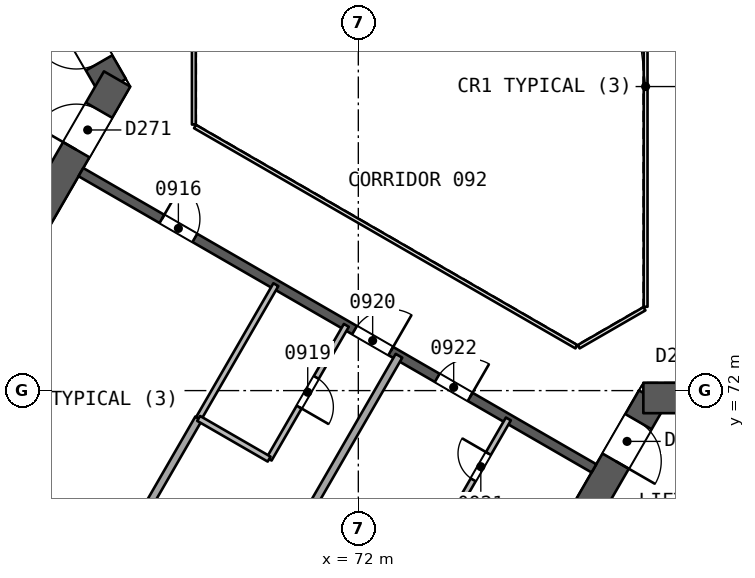
"""IFC4 building model, lengths in metres.
Left out: names, types, materials, properties, quantities, classifications, styles, units other than length and angle.
Written with IfcOpenShell. Run it as: python <this file> out.ifc"""

import sys

from ifc_helpers import new_model, si_unit, direction, frame, frame_2d, origin, place, context, subcontext, project, spatial, rectangle, extrude, element, fill, save


model = new_model("IFC4")
c1 = context("Model", 3, precision=1e-05, world=origin(), true_north=direction((0.0, 1.0)))
c2 = subcontext(c1, "Body", "Model", "MODEL_VIEW")
j1 = project(units=[si_unit("LENGTHUNIT", "METRE"), si_unit("PLANEANGLEUNIT", "RADIAN")], contexts=[c1])
p1 = place(None, origin())
s1 = spatial("IfcSite", under=j1, at=p1, CompositionType="ELEMENT")
p2 = place(p1, origin())
s2 = spatial("IfcBuilding", under=s1, at=p2, CompositionType="ELEMENT")
p3 = place(p2, frame((0.0, 0.0, 44.8)))
s3 = spatial("IfcBuildingStorey", under=s2, at=p3, CompositionType="ELEMENT", Elevation=44.8)
p4 = place(p3, frame((65.538, 80.0, 0.0), z_axis=(0.0, 0.0, 1.0), x_axis=(-0.49999662545, 0.866027352073, 0.0)))
e1 = element("IfcWall", 1, at=p4, inside=s3, PredefinedType="SHEAR", context=c2, shape_type="SweptSolid", body=[
    extrude(rectangle(XDim=10.149, YDim=0.8, at=frame_2d((5.074, 0.0))), origin(), (0.0, 0.0, 1.0), 3.7),
])
p5 = place(p4, frame((0.719, 0.0, 0.0)))
e2 = element("IfcOpeningElement", 2, at=p5, cuts=e1, PredefinedType="OPENING", context=c2, shape_type="SweptSolid", body=[
    extrude(rectangle(XDim=1.2, YDim=2.1, at=frame_2d((0.6, 1.05))), frame((0.0, 0.411, 0.0), z_axis=(0.0, -1.0, 0.0), x_axis=(1.0, 0.0, 0.0)), (0.0, 0.0, 1.0), 0.821),
])
p6 = place(p3, frame((60.664, 71.557, 0.0), z_axis=(0.0, 0.0, 1.0), x_axis=(0.50000409368, 0.866023040284, 0.0)))
e3 = element("IfcWall", 3, at=p6, inside=s3, PredefinedType="SHEAR", context=c2, shape_type="SweptSolid", body=[
    extrude(rectangle(XDim=9.98, YDim=0.8, at=frame_2d((4.99, 0.0))), origin(), (0.0, 0.0, 1.0), 3.7),
])
p7 = place(p6, frame((7.83, 0.0, 0.0)))
e4 = element("IfcOpeningElement", 4, at=p7, cuts=e3, PredefinedType="OPENING", context=c2, shape_type="SweptSolid", body=[
    extrude(rectangle(XDim=1.2, YDim=2.1, at=frame_2d((0.6, 1.05))), frame((0.0, 0.411, 0.0), z_axis=(0.0, -1.0, 0.0), x_axis=(1.0, 0.0, 0.0)), (0.0, 0.0, 1.0), 0.821),
])
p8 = place(p3, frame((79.731, 71.806, 0.0), z_axis=(0.0, 0.0, 1.0), x_axis=(-0.49999662545, -0.866027352073, 0.0)))
e5 = element("IfcWall", 5, at=p8, inside=s3, PredefinedType="SHEAR", context=c2, shape_type="SweptSolid", body=[
    extrude(rectangle(XDim=10.149, YDim=0.8, at=frame_2d((5.074, 0.0))), origin(), (0.0, 0.0, 1.0), 3.7),
])
p9 = place(p8, frame((0.719, 0.0, 0.0)))
e6 = element("IfcOpeningElement", 6, at=p9, cuts=e5, PredefinedType="OPENING", context=c2, shape_type="SweptSolid", body=[
    extrude(rectangle(XDim=1.2, YDim=2.1, at=frame_2d((0.6, 1.05))), frame((0.0, 0.411, 0.0), z_axis=(0.0, -1.0, 0.0), x_axis=(1.0, 0.0, 0.0)), (0.0, 0.0, 1.0), 0.821),
])
p10 = place(p3, frame((89.48, 71.806, 0.0), z_axis=(0.0, 0.0, 1.0), x_axis=(-1.0, 0.0, 0.0)))
e7 = element("IfcWall", 7, at=p10, inside=s3, PredefinedType="SHEAR", context=c2, shape_type="SweptSolid", body=[
    extrude(rectangle(XDim=9.98, YDim=0.8, at=frame_2d((4.99, 0.0))), origin(), (0.0, 0.0, 1.0), 3.7),
])
p11 = place(p10, frame((7.83, 0.0, 0.0)))
e8 = element("IfcOpeningElement", 8, at=p11, cuts=e7, PredefinedType="OPENING", context=c2, shape_type="SweptSolid", body=[
    extrude(rectangle(XDim=1.2, YDim=2.1, at=frame_2d((0.6, 1.05))), frame((0.0, 0.411, 0.0), z_axis=(0.0, -1.0, 0.0), x_axis=(1.0, 0.0, 0.0)), (0.0, 0.0, 1.0), 0.821),
])
p12 = place(p3, frame((64.7, 77.748, 0.0), z_axis=(0.0, 0.0, 1.0), x_axis=(0.866026492143, -0.499998114903, 0.0)))
e9 = element("IfcWall", 9, at=p12, inside=s3, PredefinedType="SHEAR", context=c2, shape_type="SweptSolid", body=[
    extrude(rectangle(XDim=15.588, YDim=0.25, at=frame_2d((7.794, 0.0))), origin(), (0.0, 0.0, 1.0), 3.2),
])
p13 = place(p12, frame((2.462, 0.0, 0.0)))
e10 = element("IfcOpeningElement", 10, at=p13, cuts=e9, PredefinedType="OPENING", context=c2, shape_type="SweptSolid", body=[
    extrude(rectangle(XDim=1.0, YDim=2.1, at=frame_2d((0.5, 1.05))), frame((0.0, 0.135, 0.0), z_axis=(0.0, -1.0, 0.0), x_axis=(1.0, 0.0, 0.0)), (0.0, 0.0, 1.0), 0.271),
])
p14 = place(p12, frame((8.315, 0.0, 0.0)))
e11 = element("IfcOpeningElement", 11, at=p14, cuts=e9, PredefinedType="OPENING", context=c2, shape_type="SweptSolid", body=[
    extrude(rectangle(XDim=1.1, YDim=2.1, at=frame_2d((0.55, 1.05))), frame((0.0, 0.135, 0.0), z_axis=(0.0, -1.0, 0.0), x_axis=(1.0, 0.0, 0.0)), (0.0, 0.0, 1.0), 0.271),
])
p15 = place(p12, frame((10.827, 0.0, 0.0)))
e12 = element("IfcOpeningElement", 12, at=p15, cuts=e9, PredefinedType="OPENING", context=c2, shape_type="SweptSolid", body=[
    extrude(rectangle(XDim=1.0, YDim=2.1, at=frame_2d((0.5, 1.05))), frame((0.0, 0.135, 0.0), z_axis=(0.0, -1.0, 0.0), x_axis=(1.0, 0.0, 0.0)), (0.0, 0.0, 1.0), 0.271),
])
p16 = place(p3, frame((62.854, 62.704, 0.0), z_axis=(0.0, 0.0, 1.0), x_axis=(0.499983889192, 0.866034705164, 0.0)))
e13 = element("IfcWall", 13, at=p16, inside=s3, PredefinedType="PARTITIONING", context=c2, shape_type="SweptSolid", body=[
    extrude(rectangle(XDim=9.889, YDim=0.2, at=frame_2d((4.944, 0.0))), origin(), (0.0, 0.0, 1.0), 3.2),
])
p17 = place(p3, frame((67.798, 71.268, 0.0), z_axis=(0.0, 0.0, 1.0), x_axis=(0.500029316959, 0.866008476969, 0.0)))
e14 = element("IfcWall", 14, at=p17, inside=s3, PredefinedType="PARTITIONING", context=c2, shape_type="SweptSolid", body=[
    extrude(rectangle(XDim=4.063, YDim=0.15, at=frame_2d((2.032, 0.0))), origin(), (0.0, 0.0, 1.0), 3.2),
])
p18 = place(p3, frame((71.684, 73.716, 0.0), z_axis=(0.0, 0.0, 1.0), x_axis=(-0.500010271798, -0.866019473278, 0.0)))
e15 = element("IfcWall", 15, at=p18, inside=s3, PredefinedType="PARTITIONING", context=c2, shape_type="SweptSolid", body=[
    extrude(rectangle(XDim=4.063, YDim=0.15, at=frame_2d((2.031, 0.0))), origin(), (0.0, 0.0, 1.0), 3.2),
])
p19 = place(p18, frame((1.582, 0.0, 0.0)))
e16 = element("IfcOpeningElement", 16, at=p19, cuts=e15, PredefinedType="OPENING", context=c2, shape_type="SweptSolid", body=[
    extrude(rectangle(XDim=0.9, YDim=2.1, at=frame_2d((0.45, 1.05))), frame((0.0, 0.085, 0.0), z_axis=(0.0, -1.0, 0.0), x_axis=(1.0, 0.0, 0.0)), (0.0, 0.0, 1.0), 0.171),
])
p20 = place(p3, frame((69.653, 70.197, 0.0), z_axis=(0.0, 0.0, 1.0), x_axis=(-0.86605268637, 0.499952742198, 0.0)))
e17 = element("IfcWall", 17, at=p20, inside=s3, PredefinedType="PARTITIONING", context=c2, shape_type="SweptSolid", body=[
    extrude(rectangle(XDim=2.141, YDim=0.15, at=frame_2d((1.071, 0.0))), origin(), (0.0, 0.0, 1.0), 3.2),
])
p21 = place(p3, frame((66.094, 60.833, 0.0), z_axis=(0.0, 0.0, 1.0), x_axis=(0.499997119037, 0.866027067103, 0.0)))
e18 = element("IfcWall", 18, at=p21, inside=s3, PredefinedType="PARTITIONING", context=c2, shape_type="SweptSolid", body=[
    extrude(rectangle(XDim=13.952, YDim=0.2, at=frame_2d((6.976, 0.0))), origin(), (0.0, 0.0, 1.0), 3.2),
])
p22 = place(p3, frame((74.498, 68.743, 0.0), z_axis=(0.0, 0.0, 1.0), x_axis=(0.499987231761, 0.866032775405, 0.0)))
e19 = element("IfcWall", 19, at=p22, inside=s3, PredefinedType="PARTITIONING", context=c2, shape_type="SweptSolid", body=[
    extrude(rectangle(XDim=2.9, YDim=0.15, at=frame_2d((1.45, 0.0))), origin(), (0.0, 0.0, 1.0), 3.2),
])
p23 = place(p22, frame((1.05, 0.0, 0.0)))
e20 = element("IfcOpeningElement", 20, at=p23, cuts=e19, PredefinedType="OPENING", context=c2, shape_type="SweptSolid", body=[
    extrude(rectangle(XDim=0.8, YDim=2.1, at=frame_2d((0.4, 1.05))), frame((0.0, 0.085, 0.0), z_axis=(0.0, -1.0, 0.0), x_axis=(1.0, 0.0, 0.0)), (0.0, 0.0, 1.0), 0.171),
])
p24 = place(p3, frame((90.798, 46.398, 0.0), z_axis=(0.0, 0.0, 1.0), x_axis=(-0.866025003598, 0.500000693143, 0.0)))
e21 = element("IfcWall", 21, at=p24, inside=s3, PredefinedType="SOLIDWALL", context=c2, shape_type="SweptSolid", body=[
    extrude(rectangle(XDim=60.966, YDim=0.3, at=frame_2d((30.483, 0.0))), origin(), (0.0, 0.0, 1.0), 3.2),
])
p25 = place(p24, frame((29.283, 0.0, 0.0)))
e22 = element("IfcOpeningElement", 22, at=p25, cuts=e21, PredefinedType="OPENING", context=c2, shape_type="SweptSolid", body=[
    extrude(rectangle(XDim=2.4, YDim=2.4, at=frame_2d((1.2, 1.2))), frame((0.0, 0.161, 0.0), z_axis=(0.0, -1.0, 0.0), x_axis=(1.0, 0.0, 0.0)), (0.0, 0.0, 1.0), 0.321),
])
p26 = place(p24, frame((34.115, 0.0, 0.0)))
e23 = element("IfcOpeningElement", 23, at=p26, cuts=e21, PredefinedType="OPENING", context=c2, shape_type="SweptSolid", body=[
    extrude(rectangle(XDim=2.4, YDim=2.4, at=frame_2d((1.2, 1.2))), frame((0.0, 0.161, 0.0), z_axis=(0.0, -1.0, 0.0), x_axis=(1.0, 0.0, 0.0)), (0.0, 0.0, 1.0), 0.321),
])
p27 = place(p24, frame((47.275, 0.0, 0.0)))
e24 = element("IfcOpeningElement", 24, at=p27, cuts=e21, PredefinedType="OPENING", context=c2, shape_type="SweptSolid", body=[
    extrude(rectangle(XDim=2.4, YDim=2.4, at=frame_2d((1.2, 1.2))), frame((0.0, 0.161, 0.0), z_axis=(0.0, -1.0, 0.0), x_axis=(1.0, 0.0, 0.0)), (0.0, 0.0, 1.0), 0.321),
])
p28 = place(p24, frame((13.063, 0.0, 0.0)))
e25 = element("IfcOpeningElement", 25, at=p28, cuts=e21, PredefinedType="OPENING", context=c2, shape_type="SweptSolid", body=[
    extrude(rectangle(XDim=2.4, YDim=2.4, at=frame_2d((1.2, 1.2))), frame((0.0, 0.161, 0.0), z_axis=(0.0, -1.0, 0.0), x_axis=(1.0, 0.0, 0.0)), (0.0, 0.0, 1.0), 0.321),
])
p29 = place(p3, frame((77.135, 64.952, 0.0), z_axis=(0.0, 0.0, 1.0), x_axis=(0.866031916153, 0.499988720078, 0.0)))
e26 = element("IfcWall", 26, at=p29, inside=s3, PredefinedType="SOLIDWALL", context=c2, shape_type="SweptSolid", body=[
    extrude(rectangle(XDim=11.35, YDim=0.2, at=frame_2d((5.675, 0.0))), origin(), (0.0, 0.0, 1.0), 3.2),
])
p30 = place(p3, frame((79.56, 74.206, 0.0), z_axis=(0.0, 0.0, 1.0), x_axis=(0.0, 1.0, 0.0)))
e27 = element("IfcWall", 27, at=p30, inside=s3, PredefinedType="PARTITIONING", context=c2, shape_type="SweptSolid", body=[
    extrude(rectangle(XDim=11.588, YDim=0.1, at=frame_2d((5.794, 0.0))), origin(), (0.0, 0.0, 1.0), 3.2),
])
p31 = place(p3, frame((67.672, 81.0, 0.0), z_axis=(0.0, 0.0, 1.0), x_axis=(0.0, -1.0, 0.0)))
e28 = element("IfcWall", 28, at=p31, inside=s3, PredefinedType="PARTITIONING", context=c2, shape_type="SweptSolid", body=[
    extrude(rectangle(XDim=2.0, YDim=0.1, at=frame_2d((1.0, 0.0))), origin(), (0.0, 0.0, 1.0), 3.2),
])
p32 = place(p3, frame((67.702, 78.948, 0.0), z_axis=(0.0, 0.0, 1.0), x_axis=(0.866026658274, -0.499997827154, 0.0)))
e29 = element("IfcWall", 29, at=p32, inside=s3, PredefinedType="PARTITIONING", context=c2, shape_type="SweptSolid", body=[
    extrude(rectangle(XDim=11.588, YDim=0.1, at=frame_2d((5.794, 0.0))), origin(), (0.0, 0.0, 1.0), 3.2),
])
p33 = place(p3, frame((77.798, 73.154, 0.0), z_axis=(0.0, 0.0, 1.0), x_axis=(0.866041268327, 0.499972520799, 0.0)))
e30 = element("IfcWall", 30, at=p33, inside=s3, PredefinedType="PARTITIONING", context=c2, shape_type="SweptSolid", body=[
    extrude(rectangle(XDim=2.0, YDim=0.1, at=frame_2d((1.0, 0.0))), origin(), (0.0, 0.0, 1.0), 3.2),
])
p34 = place(p13, origin())
e31 = element("IfcDoor", 31, at=p34, inside=s3, OperationType="SINGLE_SWING_LEFT", PredefinedType="NOTDEFINED", context=c2, shape_type="SweptSolid", body=[
    extrude(rectangle(XDim=1.0, YDim=2.1, at=frame_2d((0.5, 1.05))), frame((0.0, 0.025, 0.0), z_axis=(0.0, -1.0, 0.0), x_axis=(1.0, 0.0, 0.0)), (0.0, 0.0, 1.0), 0.05),
])
fill(e10, e31)
p35 = place(p19, origin())
e32 = element("IfcDoor", 32, at=p35, inside=s3, OperationType="SINGLE_SWING_RIGHT", PredefinedType="NOTDEFINED", context=c2, shape_type="SweptSolid", body=[
    extrude(rectangle(XDim=0.9, YDim=2.1, at=frame_2d((0.45, 1.05))), frame((0.0, 0.025, 0.0), z_axis=(0.0, -1.0, 0.0), x_axis=(1.0, 0.0, 0.0)), (0.0, 0.0, 1.0), 0.05),
])
fill(e16, e32)
p36 = place(p14, origin())
e33 = element("IfcDoor", 33, at=p36, inside=s3, OperationType="SINGLE_SWING_RIGHT", PredefinedType="NOTDEFINED", context=c2, shape_type="SweptSolid", body=[
    extrude(rectangle(XDim=1.1, YDim=2.1, at=frame_2d((0.55, 1.05))), frame((0.0, 0.025, 0.0), z_axis=(0.0, -1.0, 0.0), x_axis=(1.0, 0.0, 0.0)), (0.0, 0.0, 1.0), 0.05),
])
fill(e11, e33)
p37 = place(p23, origin())
e34 = element("IfcDoor", 34, at=p37, inside=s3, OperationType="SINGLE_SWING_RIGHT", PredefinedType="NOTDEFINED", context=c2, shape_type="SweptSolid", body=[
    extrude(rectangle(XDim=0.8, YDim=2.1, at=frame_2d((0.4, 1.05))), frame((0.0, 0.025, 0.0), z_axis=(0.0, -1.0, 0.0), x_axis=(1.0, 0.0, 0.0)), (0.0, 0.0, 1.0), 0.05),
])
fill(e20, e34)
p38 = place(p15, origin())
e35 = element("IfcDoor", 35, at=p38, inside=s3, OperationType="SINGLE_SWING_RIGHT", PredefinedType="NOTDEFINED", context=c2, shape_type="SweptSolid", body=[
    extrude(rectangle(XDim=1.0, YDim=2.1, at=frame_2d((0.5, 1.05))), frame((0.0, 0.025, 0.0), z_axis=(0.0, -1.0, 0.0), x_axis=(1.0, 0.0, 0.0)), (0.0, 0.0, 1.0), 0.05),
])
fill(e12, e35)
p39 = place(p5, origin())
e36 = element("IfcDoor", 36, at=p39, inside=s3, OperationType="SINGLE_SWING_RIGHT", PredefinedType="NOTDEFINED", context=c2, shape_type="SweptSolid", body=[
    extrude(rectangle(XDim=1.2, YDim=2.1, at=frame_2d((0.6, 1.05))), frame((0.0, 0.025, 0.0), z_axis=(0.0, -1.0, 0.0), x_axis=(1.0, 0.0, 0.0)), (0.0, 0.0, 1.0), 0.05),
])
fill(e2, e36)
p40 = place(p7, origin())
e37 = element("IfcDoor", 37, at=p40, inside=s3, OperationType="SINGLE_SWING_LEFT", PredefinedType="NOTDEFINED", context=c2, shape_type="SweptSolid", body=[
    extrude(rectangle(XDim=1.2, YDim=2.1, at=frame_2d((0.6, 1.05))), frame((0.0, 0.025, 0.0), z_axis=(0.0, -1.0, 0.0), x_axis=(1.0, 0.0, 0.0)), (0.0, 0.0, 1.0), 0.05),
])
fill(e4, e37)
p41 = place(p9, origin())
e38 = element("IfcDoor", 38, at=p41, inside=s3, OperationType="SINGLE_SWING_RIGHT", PredefinedType="NOTDEFINED", context=c2, shape_type="SweptSolid", body=[
    extrude(rectangle(XDim=1.2, YDim=2.1, at=frame_2d((0.6, 1.05))), frame((0.0, 0.025, 0.0), z_axis=(0.0, -1.0, 0.0), x_axis=(1.0, 0.0, 0.0)), (0.0, 0.0, 1.0), 0.05),
])
fill(e6, e38)
save(model, sys.argv[1])
